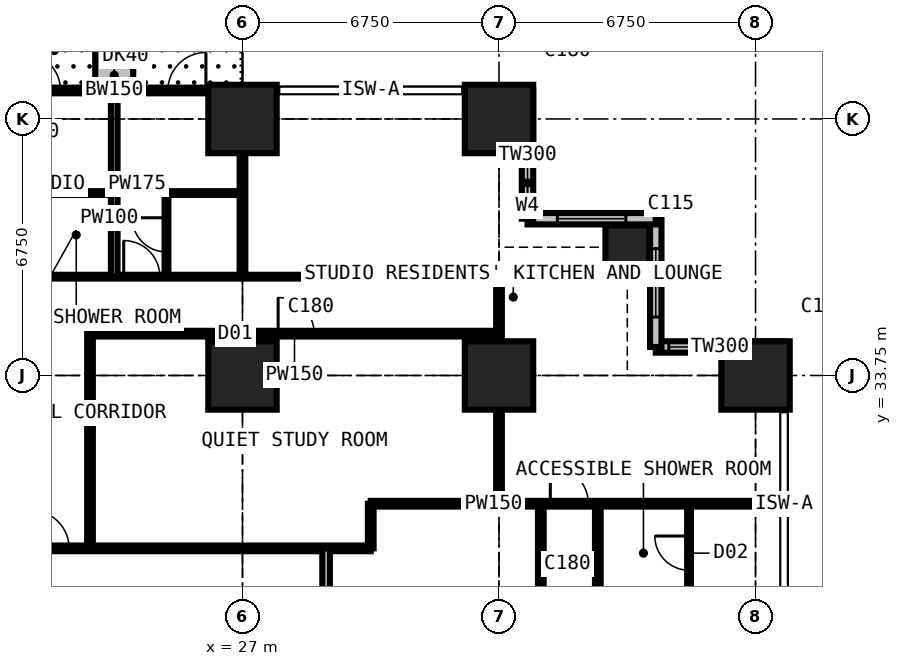
"""IFC4 building model, lengths in metres.
Left out: names, types, materials, properties, quantities, classifications, styles, units other than length and angle.
Written with IfcOpenShell. Run it as: python <this file> out.ifc"""

import sys

from ifc_helpers import new_model, si_unit, direction, frame, frame_2d, origin, origin_2d, place, context, subcontext, project, spatial, rectangle, extrude, element, fill, save


model = new_model("IFC4")
c1 = context("Model", 3, precision=1e-05, world=origin(), true_north=direction((0.0, 1.0)))
c2 = subcontext(c1, "Body", "Model", "MODEL_VIEW")
j1 = project(units=[si_unit("LENGTHUNIT", "METRE"), si_unit("PLANEANGLEUNIT", "RADIAN")], contexts=[c1])
p1 = place(None, origin())
s1 = spatial("IfcSite", under=j1, at=p1, CompositionType="ELEMENT")
p2 = place(p1, origin())
s2 = spatial("IfcBuilding", under=s1, at=p2, CompositionType="ELEMENT")
p3 = place(p2, frame((0.0, 0.0, 64.8)))
s3 = spatial("IfcBuildingStorey", under=s2, at=p3, CompositionType="ELEMENT", Elevation=64.8)
for number, where, z_axis, x_axis in (
    (1, (27.0, 33.75, 0.0), (0.0, 0.0, 1.0), (1.0, 0.0, 0.0)),
    (2, (27.0, 40.5, 0.0), (0.0, 0.0, 1.0), (1.0, 0.0, 0.0)),
    (3, (33.75, 33.75, 0.0), (0.0, 0.0, 1.0), (1.0, 0.0, 0.0)),
    (4, (33.75, 40.5, 0.0), (0.0, 0.0, 1.0), (1.0, 0.0, 0.0)),
):
    element("IfcColumn", number, at=place(p3, frame(where, z_axis=z_axis, x_axis=x_axis)), inside=s3, PredefinedType="COLUMN", context=c2, shape_type="SweptSolid", body=[
        extrude(rectangle(XDim=1.8, YDim=1.8, at=origin_2d()), origin(), (0.0, 0.0, 1.0), 3.6),
    ])
p4 = place(p3, frame((37.125, 37.125, 0.0), z_axis=(0.0, 0.0, 1.0), x_axis=(1.0, 0.0, 0.0)))
e5 = element("IfcColumn", 5, at=p4, inside=s3, PredefinedType="COLUMN", context=c2, shape_type="SweptSolid", body=[
    extrude(rectangle(XDim=1.15, YDim=1.15, at=origin_2d()), origin(), (0.0, 0.0, 1.0), 3.6),
])
p5 = place(p3, frame((40.5, 33.75, 0.0), z_axis=(0.0, 0.0, 1.0), x_axis=(1.0, 0.0, 0.0)))
e6 = element("IfcColumn", 6, at=p5, inside=s3, PredefinedType="COLUMN", context=c2, shape_type="SweptSolid", body=[
    extrude(rectangle(XDim=1.8, YDim=1.8, at=origin_2d()), origin(), (0.0, 0.0, 1.0), 3.6),
])
p6 = place(p3, frame((41.25, 34.5, 0.0), z_axis=(0.0, 0.0, 1.0), x_axis=(-1.0, 0.0, 0.0)))
e7 = element("IfcWall", 7, at=p6, inside=s3, PredefinedType="SOLIDWALL", context=c2, shape_type="SweptSolid", body=[
    extrude(rectangle(XDim=3.375, YDim=0.3, at=frame_2d((1.688, 0.0))), origin(), (0.0, 0.0, 1.0), 3.375),
])
p7 = place(p6, frame((1.833, 0.0, 0.9)))
e8 = element("IfcOpeningElement", 8, at=p7, cuts=e7, PredefinedType="OPENING", context=c2, shape_type="SweptSolid", body=[
    extrude(rectangle(XDim=1.2, YDim=1.8, at=frame_2d((0.6, 0.9))), frame((0.0, 0.16, 0.0), z_axis=(0.0, -1.0, 0.0), x_axis=(1.0, 0.0, 0.0)), (0.0, 0.0, 1.0), 0.32),
])
p8 = place(p3, frame((37.875, 34.5, 0.0), z_axis=(0.0, 0.0, 1.0), x_axis=(0.0, 1.0, 0.0)))
e9 = element("IfcWall", 9, at=p8, inside=s3, PredefinedType="SOLIDWALL", context=c2, shape_type="SweptSolid", body=[
    extrude(rectangle(XDim=3.375, YDim=0.3, at=frame_2d((1.688, 0.0))), origin(), (0.0, 0.0, 1.0), 3.375),
])
p9 = place(p8, frame((0.788, 0.0, 0.6)))
e10 = element("IfcOpeningElement", 10, at=p9, cuts=e9, PredefinedType="OPENING", context=c2, shape_type="SweptSolid", body=[
    extrude(rectangle(XDim=1.8, YDim=2.1, at=frame_2d((0.9, 1.05))), frame((0.0, 0.16, 0.0), z_axis=(0.0, -1.0, 0.0), x_axis=(1.0, 0.0, 0.0)), (0.0, 0.0, 1.0), 0.32),
])
p10 = place(p3, frame((37.875, 37.875, 0.0), z_axis=(0.0, 0.0, 1.0), x_axis=(-1.0, 0.0, 0.0)))
e11 = element("IfcWall", 11, at=p10, inside=s3, PredefinedType="SOLIDWALL", context=c2, shape_type="SweptSolid", body=[
    extrude(rectangle(XDim=3.375, YDim=0.3, at=frame_2d((1.688, 0.0))), origin(), (0.0, 0.0, 1.0), 3.375),
])
p11 = place(p10, frame((0.788, 0.0, 0.6)))
e12 = element("IfcOpeningElement", 12, at=p11, cuts=e11, PredefinedType="OPENING", context=c2, shape_type="SweptSolid", body=[
    extrude(rectangle(XDim=1.8, YDim=2.1, at=frame_2d((0.9, 1.05))), frame((0.0, 0.16, 0.0), z_axis=(0.0, -1.0, 0.0), x_axis=(1.0, 0.0, 0.0)), (0.0, 0.0, 1.0), 0.32),
])
p12 = place(p3, frame((34.5, 37.875, 0.0), z_axis=(0.0, 0.0, 1.0), x_axis=(0.0, 1.0, 0.0)))
e13 = element("IfcWall", 13, at=p12, inside=s3, PredefinedType="SOLIDWALL", context=c2, shape_type="SweptSolid", body=[
    extrude(rectangle(XDim=3.375, YDim=0.3, at=frame_2d((1.688, 0.0))), origin(), (0.0, 0.0, 1.0), 3.375),
])
p13 = place(p12, frame((0.343, 0.0, 0.9)))
e14 = element("IfcOpeningElement", 14, at=p13, cuts=e13, PredefinedType="OPENING", context=c2, shape_type="SweptSolid", body=[
    extrude(rectangle(XDim=1.2, YDim=1.8, at=frame_2d((0.6, 0.9))), frame((0.0, 0.16, 0.0), z_axis=(0.0, -1.0, 0.0), x_axis=(1.0, 0.0, 0.0)), (0.0, 0.0, 1.0), 0.32),
])
p14 = place(p3, frame((20.25, 41.25, 0.0), z_axis=(0.0, 0.0, 1.0), x_axis=(1.0, 0.0, 0.0)))
e15 = element("IfcWall", 15, at=p14, inside=s3, PredefinedType="SOLIDWALL", context=c2, shape_type="SweptSolid", body=[
    extrude(rectangle(XDim=6.75, YDim=0.15, at=frame_2d((3.375, 0.0))), origin(), (0.0, 0.0, 1.0), 3.375),
])
p15 = place(p14, frame((0.962, 0.0, 0.0)))
e16 = element("IfcOpeningElement", 16, at=p15, cuts=e15, PredefinedType="OPENING", context=c2, shape_type="SweptSolid", body=[
    extrude(rectangle(XDim=1.0, YDim=2.2, at=frame_2d((0.5, 1.1))), frame((0.0, 0.085, 0.0), z_axis=(0.0, -1.0, 0.0), x_axis=(1.0, 0.0, 0.0)), (0.0, 0.0, 1.0), 0.17),
])
p16 = place(p14, frame((2.025, 0.0, 0.9)))
e17 = element("IfcOpeningElement", 17, at=p16, cuts=e15, PredefinedType="OPENING", context=c2, shape_type="SweptSolid", body=[
    extrude(rectangle(XDim=1.2, YDim=1.8, at=frame_2d((0.6, 0.9))), frame((0.0, 0.085, 0.0), z_axis=(0.0, -1.0, 0.0), x_axis=(1.0, 0.0, 0.0)), (0.0, 0.0, 1.0), 0.17),
])
p17 = place(p14, frame((4.788, 0.0, 0.0)))
e18 = element("IfcOpeningElement", 18, at=p17, cuts=e15, PredefinedType="OPENING", context=c2, shape_type="SweptSolid", body=[
    extrude(rectangle(XDim=1.0, YDim=2.2, at=frame_2d((0.5, 1.1))), frame((0.0, 0.085, 0.0), z_axis=(0.0, -1.0, 0.0), x_axis=(1.0, 0.0, 0.0)), (0.0, 0.0, 1.0), 0.17),
])
p18 = place(p14, frame((3.525, 0.0, 0.9)))
e19 = element("IfcOpeningElement", 19, at=p18, cuts=e15, PredefinedType="OPENING", context=c2, shape_type="SweptSolid", body=[
    extrude(rectangle(XDim=1.2, YDim=1.8, at=frame_2d((0.6, 0.9))), frame((0.0, 0.085, 0.0), z_axis=(0.0, -1.0, 0.0), x_axis=(1.0, 0.0, 0.0)), (0.0, 0.0, 1.0), 0.17),
])
p19 = place(p3, frame((23.625, 41.35, 0.0), z_axis=(0.0, 0.0, 1.0), x_axis=(0.0, 1.0, 0.0)))
e20 = element("IfcWall", 20, at=p19, inside=s3, PredefinedType="USERDEFINED", context=c2, shape_type="SweptSolid", body=[
    extrude(rectangle(XDim=2.2, YDim=1.0, at=frame_2d((1.1, 0.0))), origin(), (0.0, 0.0, 1.0), 0.9),
])
p20 = place(p3, frame((10.125, 36.35, 0.0), z_axis=(0.0, 0.0, 1.0), x_axis=(1.0, 0.0, 0.0)))
e21 = element("IfcWall", 21, at=p20, inside=s3, PredefinedType="PARTITIONING", context=c2, shape_type="SweptSolid", body=[
    extrude(rectangle(XDim=23.625, YDim=0.1, at=frame_2d((11.812, 0.0))), origin(), (0.0, 0.0, 1.0), 3.375),
])
p21 = place(p20, frame((0.2, 0.0, 0.0)))
e22 = element("IfcOpeningElement", 22, at=p21, cuts=e21, PredefinedType="OPENING", context=c2, shape_type="SweptSolid", body=[
    extrude(rectangle(XDim=0.95, YDim=2.2, at=frame_2d((0.475, 1.1))), frame((0.0, 0.06, 0.0), z_axis=(0.0, -1.0, 0.0), x_axis=(1.0, 0.0, 0.0)), (0.0, 0.0, 1.0), 0.12),
])
p22 = place(p20, frame((3.625, 0.0, 0.0)))
e23 = element("IfcOpeningElement", 23, at=p22, cuts=e21, PredefinedType="OPENING", context=c2, shape_type="SweptSolid", body=[
    extrude(rectangle(XDim=0.95, YDim=2.2, at=frame_2d((0.475, 1.1))), frame((0.0, 0.06, 0.0), z_axis=(0.0, -1.0, 0.0), x_axis=(1.0, 0.0, 0.0)), (0.0, 0.0, 1.0), 0.12),
])
p23 = place(p20, frame((7.0, 0.0, 0.0)))
e24 = element("IfcOpeningElement", 24, at=p23, cuts=e21, PredefinedType="OPENING", context=c2, shape_type="SweptSolid", body=[
    extrude(rectangle(XDim=0.95, YDim=2.2, at=frame_2d((0.475, 1.1))), frame((0.0, 0.06, 0.0), z_axis=(0.0, -1.0, 0.0), x_axis=(1.0, 0.0, 0.0)), (0.0, 0.0, 1.0), 0.12),
])
p24 = place(p20, frame((10.375, 0.0, 0.0)))
e25 = element("IfcOpeningElement", 25, at=p24, cuts=e21, PredefinedType="OPENING", context=c2, shape_type="SweptSolid", body=[
    extrude(rectangle(XDim=0.95, YDim=2.2, at=frame_2d((0.475, 1.1))), frame((0.0, 0.06, 0.0), z_axis=(0.0, -1.0, 0.0), x_axis=(1.0, 0.0, 0.0)), (0.0, 0.0, 1.0), 0.12),
])
p25 = place(p20, frame((13.75, 0.0, 0.0)))
e26 = element("IfcOpeningElement", 26, at=p25, cuts=e21, PredefinedType="OPENING", context=c2, shape_type="SweptSolid", body=[
    extrude(rectangle(XDim=0.95, YDim=2.2, at=frame_2d((0.475, 1.1))), frame((0.0, 0.06, 0.0), z_axis=(0.0, -1.0, 0.0), x_axis=(1.0, 0.0, 0.0)), (0.0, 0.0, 1.0), 0.12),
])
p26 = place(p3, frame((11.3, 29.2, 0.0), z_axis=(0.0, 0.0, 1.0), x_axis=(1.0, 0.0, 0.0)))
e27 = element("IfcWall", 27, at=p26, inside=s3, PredefinedType="PARTITIONING", context=c2, shape_type="SweptSolid", body=[
    extrude(rectangle(XDim=19.075, YDim=0.15, at=frame_2d((9.538, 0.0))), origin(), (0.0, 0.0, 1.0), 3.375),
])
p27 = place(p26, frame((10.137, 0.0, 0.0)))
e28 = element("IfcOpeningElement", 28, at=p27, cuts=e27, PredefinedType="OPENING", context=c2, shape_type="SweptSolid", body=[
    extrude(rectangle(XDim=1.0, YDim=2.2, at=frame_2d((0.5, 1.1))), frame((0.0, 0.085, 0.0), z_axis=(0.0, -1.0, 0.0), x_axis=(1.0, 0.0, 0.0)), (0.0, 0.0, 1.0), 0.17),
])
p28 = place(p3, frame((21.625, 38.55, 0.0), z_axis=(0.0, 0.0, 1.0), x_axis=(1.0, 0.0, 0.0)))
e29 = element("IfcWall", 29, at=p28, inside=s3, PredefinedType="PARTITIONING", context=c2, shape_type="SweptSolid", body=[
    extrude(rectangle(XDim=2.0, YDim=0.1, at=frame_2d((1.0, 0.0))), origin(), (0.0, 0.0, 1.0), 3.375),
])
p29 = place(p3, frame((22.988, 34.85, 0.0), z_axis=(0.0, 0.0, 1.0), x_axis=(1.0, 0.0, 0.0)))
e30 = element("IfcWall", 30, at=p29, inside=s3, PredefinedType="PARTITIONING", context=c2, shape_type="SweptSolid", body=[
    extrude(rectangle(XDim=10.762, YDim=0.15, at=frame_2d((5.381, 0.0))), origin(), (0.0, 0.0, 1.0), 3.375),
])
p30 = place(p29, frame((4.95, 0.0, 0.0)))
e31 = element("IfcOpeningElement", 31, at=p30, cuts=e30, PredefinedType="OPENING", context=c2, shape_type="SweptSolid", body=[
    extrude(rectangle(XDim=0.95, YDim=2.2, at=frame_2d((0.475, 1.1))), frame((0.0, 0.085, 0.0), z_axis=(0.0, -1.0, 0.0), x_axis=(1.0, 0.0, 0.0)), (0.0, 0.0, 1.0), 0.17),
])
p31 = place(p3, frame((22.988, 29.2, 0.0), z_axis=(0.0, 0.0, 1.0), x_axis=(0.0, 1.0, 0.0)))
e32 = element("IfcWall", 32, at=p31, inside=s3, PredefinedType="PARTITIONING", context=c2, shape_type="SweptSolid", body=[
    extrude(rectangle(XDim=5.65, YDim=0.15, at=frame_2d((2.825, 0.0))), origin(), (0.0, 0.0, 1.0), 3.375),
])
p32 = place(p3, frame((23.625, 36.35, 0.0), z_axis=(0.0, 0.0, 1.0), x_axis=(0.0, 1.0, 0.0)))
e33 = element("IfcWall", 33, at=p32, inside=s3, PredefinedType="PARTITIONING", context=c2, shape_type="SweptSolid", body=[
    extrude(rectangle(XDim=4.884, YDim=0.175, at=frame_2d((2.442, 0.0))), origin(), (0.0, 0.0, 1.0), 3.375),
])
p33 = place(p3, frame((25.0, 36.35, 0.0), z_axis=(0.0, 0.0, 1.0), x_axis=(0.0, 1.0, 0.0)))
e34 = element("IfcWall", 34, at=p33, inside=s3, PredefinedType="PARTITIONING", context=c2, shape_type="SweptSolid", body=[
    extrude(rectangle(XDim=2.2, YDim=0.1, at=frame_2d((1.1, 0.0))), origin(), (0.0, 0.0, 1.0), 3.375),
])
p34 = place(p33, frame((0.65, 0.0, 0.0)))
e35 = element("IfcOpeningElement", 35, at=p34, cuts=e34, PredefinedType="OPENING", context=c2, shape_type="SweptSolid", body=[
    extrude(rectangle(XDim=0.9, YDim=2.2, at=frame_2d((0.45, 1.1))), frame((0.0, 0.06, 0.0), z_axis=(0.0, -1.0, 0.0), x_axis=(1.0, 0.0, 0.0)), (0.0, 0.0, 1.0), 0.12),
])
p35 = place(p3, frame((25.0, 38.55, 0.0), z_axis=(0.0, 0.0, 1.0), x_axis=(1.0, 0.0, 0.0)))
e36 = element("IfcWall", 36, at=p35, inside=s3, PredefinedType="PARTITIONING", context=c2, shape_type="SweptSolid", body=[
    extrude(rectangle(XDim=2.0, YDim=0.1, at=frame_2d((1.0, 0.0))), origin(), (0.0, 0.0, 1.0), 3.375),
])
p36 = place(p3, frame((27.0, 36.35, 0.0), z_axis=(0.0, 0.0, 1.0), x_axis=(0.0, 1.0, 0.0)))
e37 = element("IfcWall", 37, at=p36, inside=s3, PredefinedType="PARTITIONING", context=c2, shape_type="SweptSolid", body=[
    extrude(rectangle(XDim=4.884, YDim=0.15, at=frame_2d((2.442, 0.0))), origin(), (0.0, 0.0, 1.0), 2.806),
])
p37 = place(p3, frame((29.2, 11.3, 0.0), z_axis=(0.0, 0.0, 1.0), x_axis=(0.0, 1.0, 0.0)))
e38 = element("IfcWall", 38, at=p37, inside=s3, PredefinedType="PARTITIONING", context=c2, shape_type="SweptSolid", body=[
    extrude(rectangle(XDim=17.9, YDim=0.2, at=frame_2d((8.95, 0.0))), origin(), (0.0, 0.0, 1.0), 3.375),
])
p38 = place(p37, frame((8.35, 0.0, 0.0)))
e39 = element("IfcOpeningElement", 39, at=p38, cuts=e38, PredefinedType="OPENING", context=c2, shape_type="SweptSolid", body=[
    extrude(rectangle(XDim=1.2, YDim=2.2, at=frame_2d((0.6, 1.1))), frame((0.0, 0.11, 0.0), z_axis=(0.0, -1.0, 0.0), x_axis=(1.0, 0.0, 0.0)), (0.0, 0.0, 1.0), 0.22),
])
p39 = place(p3, frame((30.375, 29.2, 0.0), z_axis=(0.0, 0.0, 1.0), x_axis=(0.0, 1.0, 0.0)))
e40 = element("IfcWall", 40, at=p39, inside=s3, PredefinedType="PARTITIONING", context=c2, shape_type="SweptSolid", body=[
    extrude(rectangle(XDim=1.175, YDim=0.15, at=frame_2d((0.587, 0.0))), origin(), (0.0, 0.0, 1.0), 3.375),
])
p40 = place(p3, frame((30.375, 30.375, 0.0), z_axis=(0.0, 0.0, 1.0), x_axis=(1.0, 0.0, 0.0)))
e41 = element("IfcWall", 41, at=p40, inside=s3, PredefinedType="PARTITIONING", context=c2, shape_type="SweptSolid", body=[
    extrude(rectangle(XDim=10.859, YDim=0.15, at=frame_2d((5.429, 0.0))), origin(), (0.0, 0.0, 1.0), 3.375),
])
p41 = place(p40, frame((4.725, 0.0, 0.0)))
e42 = element("IfcOpeningElement", 42, at=p41, cuts=e41, PredefinedType="OPENING", context=c2, shape_type="SweptSolid", body=[
    extrude(rectangle(XDim=1.0, YDim=2.2, at=frame_2d((0.5, 1.1))), frame((0.0, 0.085, 0.0), z_axis=(0.0, -1.0, 0.0), x_axis=(1.0, 0.0, 0.0)), (0.0, 0.0, 1.0), 0.17),
])
p42 = place(p3, frame((33.75, 30.375, 0.0), z_axis=(0.0, 0.0, 1.0), x_axis=(0.0, 1.0, 0.0)))
e43 = element("IfcWall", 43, at=p42, inside=s3, PredefinedType="PARTITIONING", context=c2, shape_type="SweptSolid", body=[
    extrude(rectangle(XDim=5.975, YDim=0.15, at=frame_2d((2.988, 0.0))), origin(), (0.0, 0.0, 1.0), 2.877),
])
p43 = place(p3, frame((34.85, 12.55, 0.0), z_axis=(0.0, 0.0, 1.0), x_axis=(0.0, 1.0, 0.0)))
e44 = element("IfcWall", 44, at=p43, inside=s3, PredefinedType="PARTITIONING", context=c2, shape_type="SweptSolid", body=[
    extrude(rectangle(XDim=17.825, YDim=0.15, at=frame_2d((8.913, 0.0))), origin(), (0.0, 0.0, 1.0), 3.375),
])
p44 = place(p43, frame((8.6, 0.0, 0.0)))
e45 = element("IfcOpeningElement", 45, at=p44, cuts=e44, PredefinedType="OPENING", context=c2, shape_type="SweptSolid", body=[
    extrude(rectangle(XDim=0.95, YDim=2.2, at=frame_2d((0.475, 1.1))), frame((0.0, 0.085, 0.0), z_axis=(0.0, -1.0, 0.0), x_axis=(1.0, 0.0, 0.0)), (0.0, 0.0, 1.0), 0.17),
])
p45 = place(p3, frame((36.35, 6.75, 0.0), z_axis=(0.0, 0.0, 1.0), x_axis=(0.0, 1.0, 0.0)))
e46 = element("IfcWall", 46, at=p45, inside=s3, PredefinedType="PARTITIONING", context=c2, shape_type="SweptSolid", body=[
    extrude(rectangle(XDim=23.625, YDim=0.15, at=frame_2d((11.812, 0.0))), origin(), (0.0, 0.0, 1.0), 3.375),
])
p46 = place(p45, frame((18.475, 0.0, 0.0)))
e47 = element("IfcOpeningElement", 47, at=p46, cuts=e46, PredefinedType="OPENING", context=c2, shape_type="SweptSolid", body=[
    extrude(rectangle(XDim=0.95, YDim=2.2, at=frame_2d((0.475, 1.1))), frame((0.0, 0.085, 0.0), z_axis=(0.0, -1.0, 0.0), x_axis=(1.0, 0.0, 0.0)), (0.0, 0.0, 1.0), 0.17),
])
p47 = place(p45, frame((11.725, 0.0, 0.0)))
e48 = element("IfcOpeningElement", 48, at=p47, cuts=e46, PredefinedType="OPENING", context=c2, shape_type="SweptSolid", body=[
    extrude(rectangle(XDim=0.95, YDim=2.2, at=frame_2d((0.475, 1.1))), frame((0.0, 0.085, 0.0), z_axis=(0.0, -1.0, 0.0), x_axis=(1.0, 0.0, 0.0)), (0.0, 0.0, 1.0), 0.17),
])
p48 = place(p45, frame((6.95, 0.0, 0.0)))
e49 = element("IfcOpeningElement", 49, at=p48, cuts=e46, PredefinedType="OPENING", context=c2, shape_type="SweptSolid", body=[
    extrude(rectangle(XDim=0.95, YDim=2.2, at=frame_2d((0.475, 1.1))), frame((0.0, 0.085, 0.0), z_axis=(0.0, -1.0, 0.0), x_axis=(1.0, 0.0, 0.0)), (0.0, 0.0, 1.0), 0.17),
])
p49 = place(p3, frame((38.75, 27.775, 0.0), z_axis=(0.0, 0.0, 1.0), x_axis=(0.0, 1.0, 0.0)))
e50 = element("IfcWall", 50, at=p49, inside=s3, PredefinedType="PARTITIONING", context=c2, shape_type="SweptSolid", body=[
    extrude(rectangle(XDim=2.6, YDim=0.1, at=frame_2d((1.3, 0.0))), origin(), (0.0, 0.0, 1.0), 3.375),
])
p50 = place(p49, frame((0.85, 0.0, 0.0)))
e51 = element("IfcOpeningElement", 51, at=p50, cuts=e50, PredefinedType="OPENING", context=c2, shape_type="SweptSolid", body=[
    extrude(rectangle(XDim=0.9, YDim=2.2, at=frame_2d((0.45, 1.1))), frame((0.0, 0.06, 0.0), z_axis=(0.0, -1.0, 0.0), x_axis=(1.0, 0.0, 0.0)), (0.0, 0.0, 1.0), 0.12),
])
p51 = place(p7, origin())
e52 = element("IfcWindow", 52, at=p51, inside=s3, PartitioningType="SINGLE_PANEL", PredefinedType="WINDOW", context=c2, shape_type="SweptSolid", body=[
    extrude(rectangle(XDim=1.2, YDim=1.8, at=frame_2d((0.6, 0.9))), frame((0.0, 0.03, 0.0), z_axis=(0.0, -1.0, 0.0), x_axis=(1.0, 0.0, 0.0)), (0.0, 0.0, 1.0), 0.06),
])
fill(e8, e52)
p52 = place(p9, origin())
e53 = element("IfcWindow", 53, at=p52, inside=s3, PartitioningType="SINGLE_PANEL", PredefinedType="WINDOW", context=c2, shape_type="SweptSolid", body=[
    extrude(rectangle(XDim=1.8, YDim=2.1, at=frame_2d((0.9, 1.05))), frame((0.0, 0.03, 0.0), z_axis=(0.0, -1.0, 0.0), x_axis=(1.0, 0.0, 0.0)), (0.0, 0.0, 1.0), 0.06),
])
fill(e10, e53)
p53 = place(p11, origin())
e54 = element("IfcWindow", 54, at=p53, inside=s3, PartitioningType="SINGLE_PANEL", PredefinedType="WINDOW", context=c2, shape_type="SweptSolid", body=[
    extrude(rectangle(XDim=1.8, YDim=2.1, at=frame_2d((0.9, 1.05))), frame((0.0, 0.03, 0.0), z_axis=(0.0, -1.0, 0.0), x_axis=(1.0, 0.0, 0.0)), (0.0, 0.0, 1.0), 0.06),
])
fill(e12, e54)
p54 = place(p13, origin())
e55 = element("IfcWindow", 55, at=p54, inside=s3, PartitioningType="SINGLE_PANEL", PredefinedType="WINDOW", context=c2, shape_type="SweptSolid", body=[
    extrude(rectangle(XDim=1.2, YDim=1.8, at=frame_2d((0.6, 0.9))), frame((0.0, 0.03, 0.0), z_axis=(0.0, -1.0, 0.0), x_axis=(1.0, 0.0, 0.0)), (0.0, 0.0, 1.0), 0.06),
])
fill(e14, e55)
p55 = place(p15, origin())
e56 = element("IfcDoor", 56, at=p55, inside=s3, OperationType="SINGLE_SWING_LEFT", PredefinedType="DOOR", context=c2, shape_type="SweptSolid", body=[
    extrude(rectangle(XDim=1.0, YDim=2.2, at=frame_2d((0.5, 1.1))), frame((0.0, 0.025, 0.0), z_axis=(0.0, -1.0, 0.0), x_axis=(1.0, 0.0, 0.0)), (0.0, 0.0, 1.0), 0.05),
])
fill(e16, e56)
p56 = place(p16, origin())
e57 = element("IfcWindow", 57, at=p56, inside=s3, PartitioningType="SINGLE_PANEL", PredefinedType="WINDOW", context=c2, shape_type="SweptSolid", body=[
    extrude(rectangle(XDim=1.2, YDim=1.8, at=frame_2d((0.6, 0.9))), frame((0.0, 0.03, 0.0), z_axis=(0.0, -1.0, 0.0), x_axis=(1.0, 0.0, 0.0)), (0.0, 0.0, 1.0), 0.06),
])
fill(e17, e57)
p57 = place(p17, origin())
e58 = element("IfcDoor", 58, at=p57, inside=s3, OperationType="SINGLE_SWING_RIGHT", PredefinedType="DOOR", context=c2, shape_type="SweptSolid", body=[
    extrude(rectangle(XDim=1.0, YDim=2.2, at=frame_2d((0.5, 1.1))), frame((0.0, 0.025, 0.0), z_axis=(0.0, -1.0, 0.0), x_axis=(1.0, 0.0, 0.0)), (0.0, 0.0, 1.0), 0.05),
])
fill(e18, e58)
p58 = place(p18, origin())
e59 = element("IfcWindow", 59, at=p58, inside=s3, PartitioningType="SINGLE_PANEL", PredefinedType="WINDOW", context=c2, shape_type="SweptSolid", body=[
    extrude(rectangle(XDim=1.2, YDim=1.8, at=frame_2d((0.6, 0.9))), frame((0.0, 0.03, 0.0), z_axis=(0.0, -1.0, 0.0), x_axis=(1.0, 0.0, 0.0)), (0.0, 0.0, 1.0), 0.06),
])
fill(e19, e59)
p59 = place(p50, origin())
e60 = element("IfcDoor", 60, at=p59, inside=s3, OperationType="SINGLE_SWING_RIGHT", PredefinedType="DOOR", context=c2, shape_type="SweptSolid", body=[
    extrude(rectangle(XDim=0.9, YDim=2.2, at=frame_2d((0.45, 1.1))), frame((0.0, 0.025, 0.0), z_axis=(0.0, -1.0, 0.0), x_axis=(1.0, 0.0, 0.0)), (0.0, 0.0, 1.0), 0.05),
])
fill(e51, e60)
p60 = place(p41, origin())
e61 = element("IfcDoor", 61, at=p60, inside=s3, OperationType="SINGLE_SWING_LEFT", PredefinedType="DOOR", context=c2, shape_type="SweptSolid", body=[
    extrude(rectangle(XDim=1.0, YDim=2.2, at=frame_2d((0.5, 1.1))), frame((0.0, 0.025, 0.0), z_axis=(0.0, -1.0, 0.0), x_axis=(1.0, 0.0, 0.0)), (0.0, 0.0, 1.0), 0.05),
])
fill(e42, e61)
p61 = place(p25, origin())
e62 = element("IfcDoor", 62, at=p61, inside=s3, OperationType="SINGLE_SWING_LEFT", PredefinedType="DOOR", context=c2, shape_type="SweptSolid", body=[
    extrude(rectangle(XDim=0.95, YDim=2.2, at=frame_2d((0.475, 1.1))), frame((0.0, 0.025, 0.0), z_axis=(0.0, -1.0, 0.0), x_axis=(1.0, 0.0, 0.0)), (0.0, 0.0, 1.0), 0.05),
])
fill(e26, e62)
p62 = place(p34, origin())
e63 = element("IfcDoor", 63, at=p62, inside=s3, OperationType="SINGLE_SWING_RIGHT", PredefinedType="DOOR", context=c2, shape_type="SweptSolid", body=[
    extrude(rectangle(XDim=0.9, YDim=2.2, at=frame_2d((0.45, 1.1))), frame((0.0, 0.025, 0.0), z_axis=(0.0, -1.0, 0.0), x_axis=(1.0, 0.0, 0.0)), (0.0, 0.0, 1.0), 0.05),
])
fill(e35, e63)
p63 = place(p27, origin())
e64 = element("IfcDoor", 64, at=p63, inside=s3, OperationType="SINGLE_SWING_LEFT", PredefinedType="DOOR", context=c2, shape_type="SweptSolid", body=[
    extrude(rectangle(XDim=1.0, YDim=2.2, at=frame_2d((0.5, 1.1))), frame((0.0, 0.025, 0.0), z_axis=(0.0, -1.0, 0.0), x_axis=(1.0, 0.0, 0.0)), (0.0, 0.0, 1.0), 0.05),
])
fill(e28, e64)
p64 = place(p30, origin())
e65 = element("IfcDoor", 65, at=p64, inside=s3, OperationType="SINGLE_SWING_LEFT", PredefinedType="DOOR", context=c2, shape_type="SweptSolid", body=[
    extrude(rectangle(XDim=0.95, YDim=2.2, at=frame_2d((0.475, 1.1))), frame((0.0, 0.025, 0.0), z_axis=(0.0, -1.0, 0.0), x_axis=(1.0, 0.0, 0.0)), (0.0, 0.0, 1.0), 0.05),
])
fill(e31, e65)
save(model, sys.argv[1])
